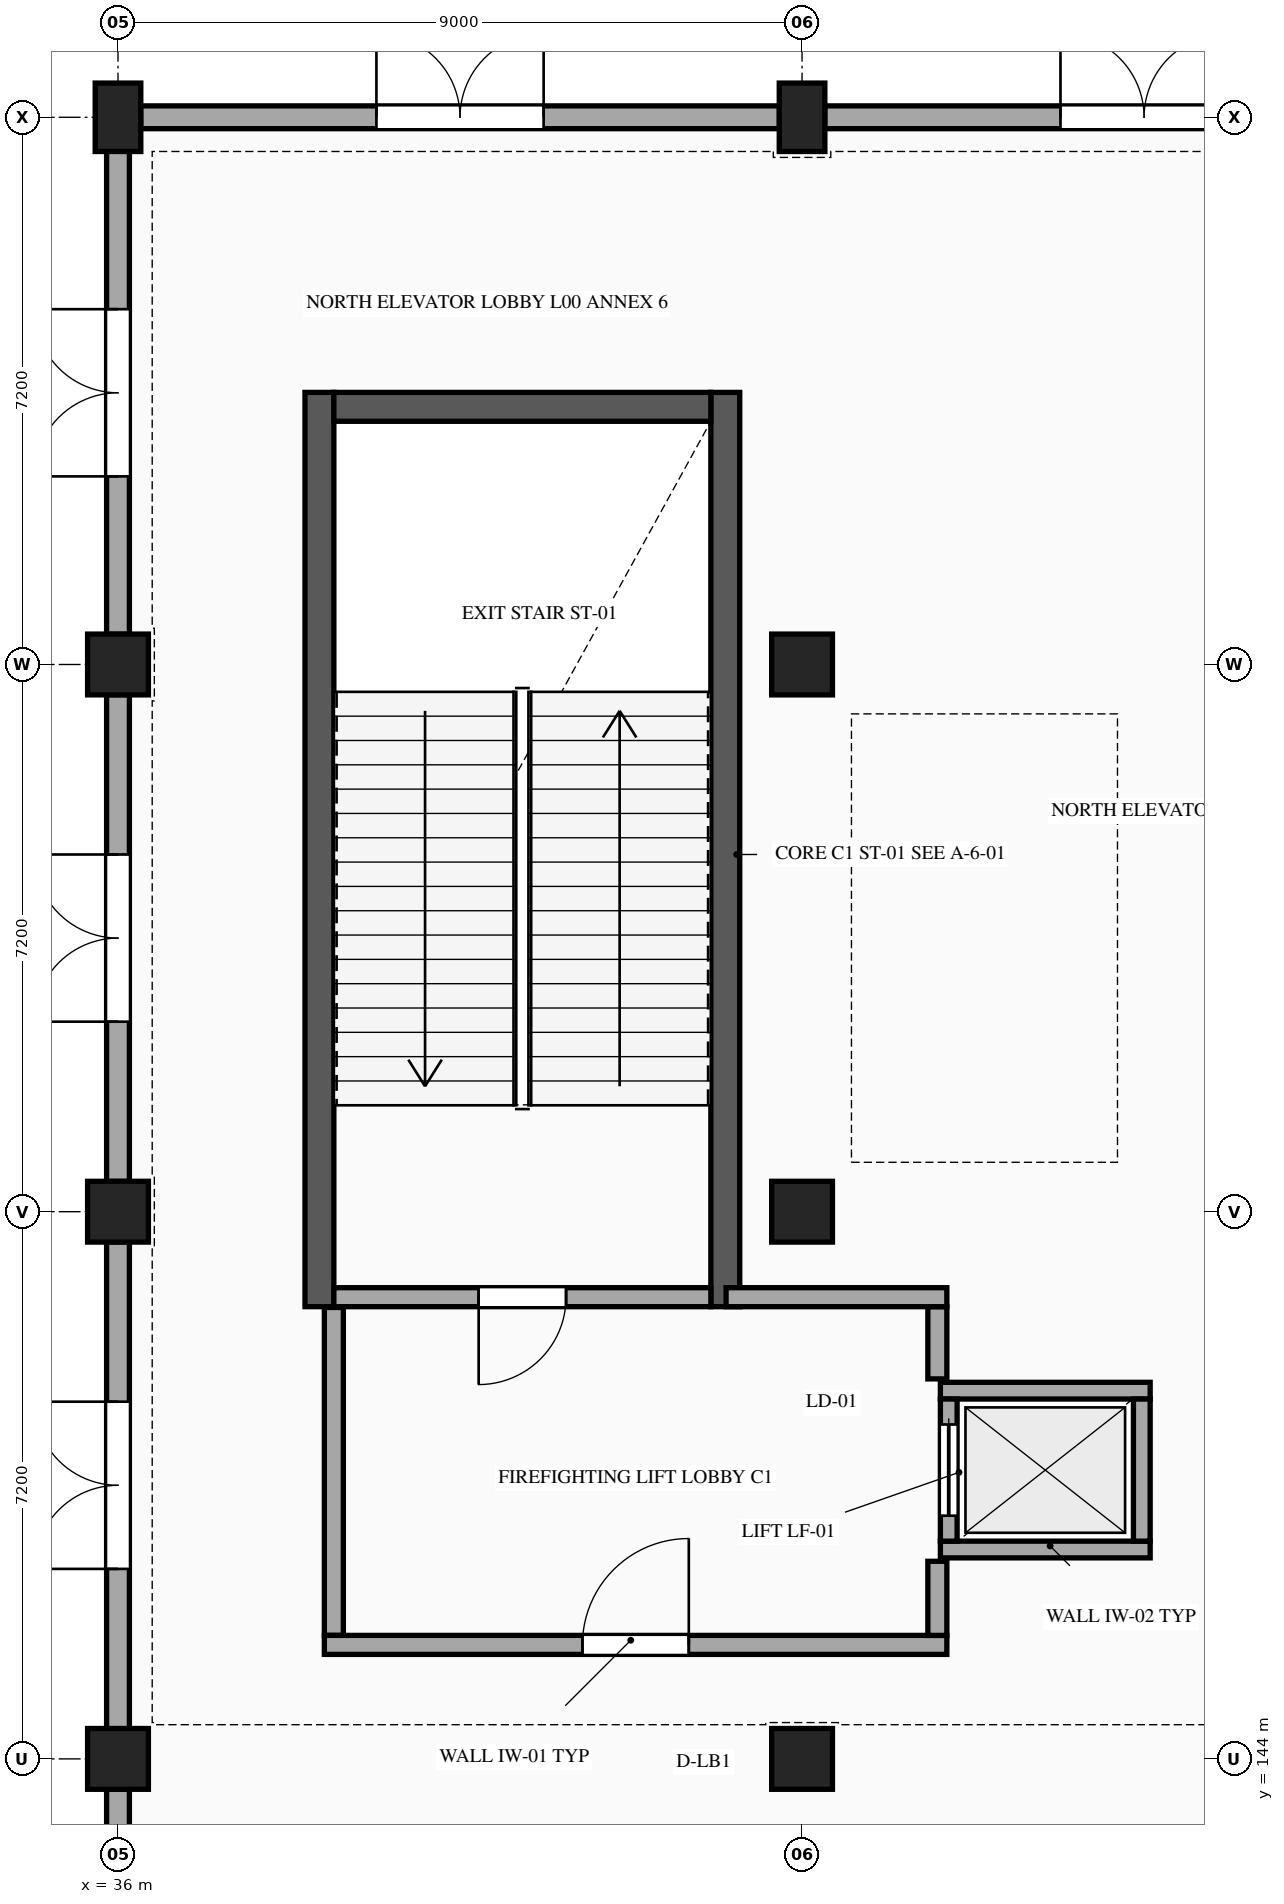
"""IFC4 building model, lengths in metres.
Left out: names, types, materials, properties, quantities, classifications, styles, units other than length and angle.
Written with IfcOpenShell. Run it as: python <this file> out.ifc"""

import sys

from ifc_helpers import new_model, si_unit, direction, frame, frame_2d, origin, origin_2d, place, context, subcontext, project, spatial, rectangle, extrude, element, fill, save


model = new_model("IFC4")
c1 = context("Model", 3, precision=1e-05, world=origin(), true_north=direction((0.0, 1.0)))
c2 = subcontext(c1, "Body", "Model", "MODEL_VIEW")
j1 = project(units=[si_unit("LENGTHUNIT", "METRE"), si_unit("PLANEANGLEUNIT", "RADIAN")], contexts=[c1])
p1 = place(None, origin())
s1 = spatial("IfcSite", under=j1, at=p1, CompositionType="ELEMENT")
p2 = place(p1, origin())
s2 = spatial("IfcBuilding", under=s1, at=p2, CompositionType="ELEMENT")
p3 = place(p2, origin())
s3 = spatial("IfcBuildingStorey", under=s2, at=p3, CompositionType="ELEMENT", Elevation=0.0)
for number, where, z_axis, x_axis in (
    (1, (36.0, 144.0, 0.0), (0.0, 0.0, 1.0), (1.0, 0.0, 0.0)),
    (2, (36.0, 151.2, 0.0), (0.0, 0.0, 1.0), (1.0, 0.0, 0.0)),
    (3, (36.0, 158.4, 0.0), (0.0, 0.0, 1.0), (1.0, 0.0, 0.0)),
):
    element("IfcColumn", number, at=place(p3, frame(where, z_axis=z_axis, x_axis=x_axis)), inside=s3, PredefinedType="COLUMN", context=c2, shape_type="SweptSolid", body=[
        extrude(rectangle(XDim=0.8, YDim=0.8, at=origin_2d()), origin(), (0.0, 0.0, 1.0), 5.4),
    ])
p4 = place(p3, frame((36.0, 165.6, 0.0), z_axis=(0.0, 0.0, 1.0), x_axis=(1.0, 0.0, 0.0)))
e4 = element("IfcColumn", 4, at=p4, inside=s3, PredefinedType="COLUMN", context=c2, shape_type="SweptSolid", body=[
    extrude(rectangle(XDim=0.6, YDim=0.9, at=origin_2d()), origin(), (0.0, 0.0, 1.0), 5.4),
])
for number, where, z_axis, x_axis in (
    (5, (45.0, 144.0, 0.0), (0.0, 0.0, 1.0), (1.0, 0.0, 0.0)),
    (6, (45.0, 151.2, 0.0), (0.0, 0.0, 1.0), (1.0, 0.0, 0.0)),
    (7, (45.0, 158.4, 0.0), (0.0, 0.0, 1.0), (1.0, 0.0, 0.0)),
):
    element("IfcColumn", number, at=place(p3, frame(where, z_axis=z_axis, x_axis=x_axis)), inside=s3, PredefinedType="COLUMN", context=c2, shape_type="SweptSolid", body=[
        extrude(rectangle(XDim=0.8, YDim=0.8, at=origin_2d()), origin(), (0.0, 0.0, 1.0), 5.4),
    ])
p5 = place(p3, frame((45.0, 165.6, 0.0), z_axis=(0.0, 0.0, 1.0), x_axis=(1.0, 0.0, 0.0)))
e8 = element("IfcColumn", 8, at=p5, inside=s3, PredefinedType="COLUMN", context=c2, shape_type="SweptSolid", body=[
    extrude(rectangle(XDim=0.6, YDim=0.9, at=origin_2d()), origin(), (0.0, 0.0, 1.0), 5.4),
])
for number, where, z_axis, x_axis in (
    (9, (38.65, 149.95, 0.0), (0.0, 0.0, 1.0), (0.0, 1.0, 0.0)),
    (10, (43.99, 161.98, 0.0), (0.0, 0.0, 1.0), (0.0, -1.0, 0.0)),
):
    element("IfcWall", number, at=place(p3, frame(where, z_axis=z_axis, x_axis=x_axis)), inside=s3, PredefinedType="SHEAR", context=c2, shape_type="SweptSolid", body=[
        extrude(rectangle(XDim=12.03, YDim=0.38, at=frame_2d((6.015, 0.0))), origin(), (0.0, 0.0, 1.0), 5.12),
    ])
p6 = place(p3, frame((38.84, 161.79, 0.0), z_axis=(0.0, 0.0, 1.0), x_axis=(1.0, 0.0, 0.0)))
e11 = element("IfcWall", 11, at=p6, inside=s3, PredefinedType="SHEAR", context=c2, shape_type="SweptSolid", body=[
    extrude(rectangle(XDim=4.96, YDim=0.38, at=frame_2d((2.48, 0.0))), origin(), (0.0, 0.0, 1.0), 5.12),
])
p7 = place(p3, frame((36.0, 137.198, 0.0), z_axis=(0.0, 0.0, 1.0), x_axis=(0.0, 1.0, 0.0)))
e12 = element("IfcWall", 12, at=p7, inside=s3, PredefinedType="STANDARD", context=c2, shape_type="SweptSolid", body=[
    extrude(rectangle(XDim=6.404, YDim=0.3, at=frame_2d((3.202, 0.0))), origin(), (0.0, 0.0, 1.0), 4.82),
])
p8 = place(p7, frame((2.102, 0.0, 0.0)))
e13 = element("IfcOpeningElement", 13, at=p8, cuts=e12, PredefinedType="OPENING", context=c2, shape_type="SweptSolid", body=[
    extrude(rectangle(XDim=2.2, YDim=2.4, at=frame_2d((1.1, 1.2))), frame((0.0, 0.16, 0.0), z_axis=(0.0, -1.0, 0.0), x_axis=(1.0, 0.0, 0.0)), (0.0, 0.0, 1.0), 0.32),
])
p9 = place(p3, frame((36.0, 144.398, 0.0), z_axis=(0.0, 0.0, 1.0), x_axis=(0.0, 1.0, 0.0)))
e14 = element("IfcWall", 14, at=p9, inside=s3, PredefinedType="STANDARD", context=c2, shape_type="SweptSolid", body=[
    extrude(rectangle(XDim=6.404, YDim=0.3, at=frame_2d((3.202, 0.0))), origin(), (0.0, 0.0, 1.0), 4.82),
])
p10 = place(p9, frame((2.102, 0.0, 0.0)))
e15 = element("IfcOpeningElement", 15, at=p10, cuts=e14, PredefinedType="OPENING", context=c2, shape_type="SweptSolid", body=[
    extrude(rectangle(XDim=2.2, YDim=2.4, at=frame_2d((1.1, 1.2))), frame((0.0, 0.16, 0.0), z_axis=(0.0, -1.0, 0.0), x_axis=(1.0, 0.0, 0.0)), (0.0, 0.0, 1.0), 0.32),
])
p11 = place(p3, frame((36.0, 151.598, 0.0), z_axis=(0.0, 0.0, 1.0), x_axis=(0.0, 1.0, 0.0)))
e16 = element("IfcWall", 16, at=p11, inside=s3, PredefinedType="STANDARD", context=c2, shape_type="SweptSolid", body=[
    extrude(rectangle(XDim=6.404, YDim=0.3, at=frame_2d((3.202, 0.0))), origin(), (0.0, 0.0, 1.0), 4.82),
])
p12 = place(p11, frame((2.102, 0.0, 0.0)))
e17 = element("IfcOpeningElement", 17, at=p12, cuts=e16, PredefinedType="OPENING", context=c2, shape_type="SweptSolid", body=[
    extrude(rectangle(XDim=2.2, YDim=2.4, at=frame_2d((1.1, 1.2))), frame((0.0, 0.16, 0.0), z_axis=(0.0, -1.0, 0.0), x_axis=(1.0, 0.0, 0.0)), (0.0, 0.0, 1.0), 0.32),
])
p13 = place(p3, frame((36.0, 158.798, 0.0), z_axis=(0.0, 0.0, 1.0), x_axis=(0.0, 1.0, 0.0)))
e18 = element("IfcWall", 18, at=p13, inside=s3, PredefinedType="STANDARD", context=c2, shape_type="SweptSolid", body=[
    extrude(rectangle(XDim=6.354, YDim=0.3, at=frame_2d((3.177, 0.0))), origin(), (0.0, 0.0, 1.0), 4.82),
])
p14 = place(p13, frame((2.077, 0.0, 0.0)))
e19 = element("IfcOpeningElement", 19, at=p14, cuts=e18, PredefinedType="OPENING", context=c2, shape_type="SweptSolid", body=[
    extrude(rectangle(XDim=2.2, YDim=2.4, at=frame_2d((1.1, 1.2))), frame((0.0, 0.16, 0.0), z_axis=(0.0, -1.0, 0.0), x_axis=(1.0, 0.0, 0.0)), (0.0, 0.0, 1.0), 0.32),
])
p15 = place(p3, frame((36.298, 165.6, 0.0), z_axis=(0.0, 0.0, 1.0), x_axis=(1.0, 0.0, 0.0)))
e20 = element("IfcWall", 20, at=p15, inside=s3, PredefinedType="STANDARD", context=c2, shape_type="SweptSolid", body=[
    extrude(rectangle(XDim=8.404, YDim=0.3, at=frame_2d((4.202, 0.0))), origin(), (0.0, 0.0, 1.0), 4.747),
])
p16 = place(p15, frame((3.102, 0.0, 0.0)))
e21 = element("IfcOpeningElement", 21, at=p16, cuts=e20, PredefinedType="OPENING", context=c2, shape_type="SweptSolid", body=[
    extrude(rectangle(XDim=2.2, YDim=2.4, at=frame_2d((1.1, 1.2))), frame((0.0, 0.16, 0.0), z_axis=(0.0, -1.0, 0.0), x_axis=(1.0, 0.0, 0.0)), (0.0, 0.0, 1.0), 0.32),
])
p17 = place(p3, frame((45.298, 165.6, 0.0), z_axis=(0.0, 0.0, 1.0), x_axis=(1.0, 0.0, 0.0)))
e22 = element("IfcWall", 22, at=p17, inside=s3, PredefinedType="STANDARD", context=c2, shape_type="SweptSolid", body=[
    extrude(rectangle(XDim=8.404, YDim=0.3, at=frame_2d((4.202, 0.0))), origin(), (0.0, 0.0, 1.0), 4.653),
])
p18 = place(p17, frame((3.102, 0.0, 0.0)))
e23 = element("IfcOpeningElement", 23, at=p18, cuts=e22, PredefinedType="OPENING", context=c2, shape_type="SweptSolid", body=[
    extrude(rectangle(XDim=2.2, YDim=2.4, at=frame_2d((1.1, 1.2))), frame((0.0, 0.16, 0.0), z_axis=(0.0, -1.0, 0.0), x_axis=(1.0, 0.0, 0.0)), (0.0, 0.0, 1.0), 0.32),
])
p19 = place(p3, frame((43.8, 150.075, 0.0), z_axis=(0.0, 0.0, 1.0), x_axis=(-1.0, 0.0, 0.0)))
e24 = element("IfcWall", 24, at=p19, inside=s3, PredefinedType="STANDARD", context=c2, shape_type="SweptSolid", body=[
    extrude(rectangle(XDim=4.96, YDim=0.25, at=frame_2d((2.48, 0.0))), origin(), (0.0, 0.0, 1.0), 5.08),
])
p20 = place(p19, frame((1.905, 0.0, 0.0)))
e25 = element("IfcOpeningElement", 25, at=p20, cuts=e24, PredefinedType="OPENING", context=c2, shape_type="SweptSolid", body=[
    extrude(rectangle(XDim=1.15, YDim=2.2, at=frame_2d((0.575, 1.1))), frame((0.0, 0.135, 0.0), z_axis=(0.0, -1.0, 0.0), x_axis=(1.0, 0.0, 0.0)), (0.0, 0.0, 1.0), 0.27),
])
for number, where, z_axis, x_axis in (
    (26, (46.82, 146.755, 0.0), (0.0, 0.0, 1.0), (1.0, 0.0, 0.0)),
    (27, (49.58, 148.845, 0.0), (0.0, 0.0, 1.0), (-1.0, 0.0, 0.0)),
):
    element("IfcWall", number, at=place(p3, frame(where, z_axis=z_axis, x_axis=x_axis)), inside=s3, PredefinedType="STANDARD", context=c2, shape_type="SweptSolid", body=[
        extrude(rectangle(XDim=2.76, YDim=0.22, at=frame_2d((1.38, 0.0))), origin(), (0.0, 0.0, 1.0), 5.08),
    ])
p21 = place(p3, frame((46.93, 148.735, 0.0), z_axis=(0.0, 0.0, 1.0), x_axis=(0.0, -1.0, 0.0)))
e28 = element("IfcWall", 28, at=p21, inside=s3, PredefinedType="STANDARD", context=c2, shape_type="SweptSolid", body=[
    extrude(rectangle(XDim=1.87, YDim=0.22, at=frame_2d((0.935, 0.0))), origin(), (0.0, 0.0, 1.0), 5.08),
])
p22 = place(p21, frame((0.335, 0.0, 0.0)))
e29 = element("IfcOpeningElement", 29, at=p22, cuts=e28, PredefinedType="OPENING", context=c2, shape_type="SweptSolid", body=[
    extrude(rectangle(XDim=1.2, YDim=2.2, at=frame_2d((0.6, 1.1))), frame((0.0, 0.12, 0.0), z_axis=(0.0, -1.0, 0.0), x_axis=(1.0, 0.0, 0.0)), (0.0, 0.0, 1.0), 0.24),
])
p23 = place(p3, frame((49.47, 146.865, 0.0), z_axis=(0.0, 0.0, 1.0), x_axis=(0.0, 1.0, 0.0)))
e30 = element("IfcWall", 30, at=p23, inside=s3, PredefinedType="STANDARD", context=c2, shape_type="SweptSolid", body=[
    extrude(rectangle(XDim=1.87, YDim=0.22, at=frame_2d((0.935, 0.0))), origin(), (0.0, 0.0, 1.0), 5.08),
])
p24 = place(p3, frame((38.84, 149.94, 0.0), z_axis=(0.0, 0.0, 1.0), x_axis=(0.0, -1.0, 0.0)))
e31 = element("IfcWall", 31, at=p24, inside=s3, PredefinedType="STANDARD", context=c2, shape_type="SweptSolid", body=[
    extrude(rectangle(XDim=4.315, YDim=0.25, at=frame_2d((2.157, 0.0))), origin(), (0.0, 0.0, 1.0), 4.437),
])
p25 = place(p3, frame((38.715, 145.5, 0.0), z_axis=(0.0, 0.0, 1.0), x_axis=(1.0, 0.0, 0.0)))
e32 = element("IfcWall", 32, at=p25, inside=s3, PredefinedType="STANDARD", context=c2, shape_type="SweptSolid", body=[
    extrude(rectangle(XDim=8.19, YDim=0.25, at=frame_2d((4.095, 0.0))), origin(), (0.0, 0.0, 1.0), 4.437),
])
p26 = place(p25, frame((3.395, 0.0, 0.0)))
e33 = element("IfcOpeningElement", 33, at=p26, cuts=e32, PredefinedType="OPENING", context=c2, shape_type="SweptSolid", body=[
    extrude(rectangle(XDim=1.4, YDim=2.2, at=frame_2d((0.7, 1.1))), frame((0.0, 0.135, 0.0), z_axis=(0.0, -1.0, 0.0), x_axis=(1.0, 0.0, 0.0)), (0.0, 0.0, 1.0), 0.27),
])
p27 = place(p3, frame((46.78, 145.625, 0.0), z_axis=(0.0, 0.0, 1.0), x_axis=(0.0, 1.0, 0.0)))
e34 = element("IfcWall", 34, at=p27, inside=s3, PredefinedType="STANDARD", context=c2, shape_type="SweptSolid", body=[
    extrude(rectangle(XDim=0.975, YDim=0.25, at=frame_2d((0.488, 0.0))), origin(), (0.0, 0.0, 1.0), 4.437),
])
p28 = place(p3, frame((46.78, 149.0, 0.0), z_axis=(0.0, 0.0, 1.0), x_axis=(0.0, 1.0, 0.0)))
e35 = element("IfcWall", 35, at=p28, inside=s3, PredefinedType="STANDARD", context=c2, shape_type="SweptSolid", body=[
    extrude(rectangle(XDim=0.95, YDim=0.25, at=frame_2d((0.475, 0.0))), origin(), (0.0, 0.0, 1.0), 4.437),
])
p29 = place(p3, frame((44.0, 150.075, 0.0), z_axis=(0.0, 0.0, 1.0), x_axis=(1.0, 0.0, 0.0)))
e36 = element("IfcWall", 36, at=p29, inside=s3, PredefinedType="STANDARD", context=c2, shape_type="SweptSolid", body=[
    extrude(rectangle(XDim=2.905, YDim=0.25, at=frame_2d((1.453, 0.0))), origin(), (0.0, 0.0, 1.0), 4.437),
])
p30 = place(p10, origin())
e37 = element("IfcDoor", 37, at=p30, inside=s3, OperationType="DOUBLE_DOOR_SINGLE_SWING", PredefinedType="DOOR", context=c2, shape_type="SweptSolid", body=[
    extrude(rectangle(XDim=2.2, YDim=2.4, at=frame_2d((1.1, 1.2))), frame((0.0, 0.025, 0.0), z_axis=(0.0, -1.0, 0.0), x_axis=(1.0, 0.0, 0.0)), (0.0, 0.0, 1.0), 0.05),
])
fill(e15, e37)
p31 = place(p12, origin())
e38 = element("IfcDoor", 38, at=p31, inside=s3, OperationType="DOUBLE_DOOR_SINGLE_SWING", PredefinedType="DOOR", context=c2, shape_type="SweptSolid", body=[
    extrude(rectangle(XDim=2.2, YDim=2.4, at=frame_2d((1.1, 1.2))), frame((0.0, 0.025, 0.0), z_axis=(0.0, -1.0, 0.0), x_axis=(1.0, 0.0, 0.0)), (0.0, 0.0, 1.0), 0.05),
])
fill(e17, e38)
p32 = place(p14, origin())
e39 = element("IfcDoor", 39, at=p32, inside=s3, OperationType="DOUBLE_DOOR_SINGLE_SWING", PredefinedType="DOOR", context=c2, shape_type="SweptSolid", body=[
    extrude(rectangle(XDim=2.2, YDim=2.4, at=frame_2d((1.1, 1.2))), frame((0.0, 0.025, 0.0), z_axis=(0.0, -1.0, 0.0), x_axis=(1.0, 0.0, 0.0)), (0.0, 0.0, 1.0), 0.05),
])
fill(e19, e39)
p33 = place(p16, origin())
e40 = element("IfcDoor", 40, at=p33, inside=s3, OperationType="DOUBLE_DOOR_SINGLE_SWING", PredefinedType="DOOR", context=c2, shape_type="SweptSolid", body=[
    extrude(rectangle(XDim=2.2, YDim=2.4, at=frame_2d((1.1, 1.2))), frame((0.0, 0.025, 0.0), z_axis=(0.0, -1.0, 0.0), x_axis=(1.0, 0.0, 0.0)), (0.0, 0.0, 1.0), 0.05),
])
fill(e21, e40)
p34 = place(p18, origin())
e41 = element("IfcDoor", 41, at=p34, inside=s3, OperationType="DOUBLE_DOOR_SINGLE_SWING", PredefinedType="DOOR", context=c2, shape_type="SweptSolid", body=[
    extrude(rectangle(XDim=2.2, YDim=2.4, at=frame_2d((1.1, 1.2))), frame((0.0, 0.025, 0.0), z_axis=(0.0, -1.0, 0.0), x_axis=(1.0, 0.0, 0.0)), (0.0, 0.0, 1.0), 0.05),
])
fill(e23, e41)
p35 = place(p20, origin())
e42 = element("IfcDoor", 42, at=p35, inside=s3, OperationType="SINGLE_SWING_RIGHT", PredefinedType="DOOR", context=c2, shape_type="SweptSolid", body=[
    extrude(rectangle(XDim=1.15, YDim=2.2, at=frame_2d((0.575, 1.1))), frame((0.0, 0.025, 0.0), z_axis=(0.0, -1.0, 0.0), x_axis=(1.0, 0.0, 0.0)), (0.0, 0.0, 1.0), 0.05),
])
fill(e25, e42)
p36 = place(p22, origin())
e43 = element("IfcDoor", 43, at=p36, inside=s3, OperationType="DOUBLE_DOOR_SLIDING", PredefinedType="DOOR", context=c2, shape_type="SweptSolid", body=[
    extrude(rectangle(XDim=1.2, YDim=2.2, at=frame_2d((0.6, 1.1))), frame((0.0, 0.025, 0.0), z_axis=(0.0, -1.0, 0.0), x_axis=(1.0, 0.0, 0.0)), (0.0, 0.0, 1.0), 0.05),
])
fill(e29, e43)
p37 = place(p26, origin())
e44 = element("IfcDoor", 44, at=p37, inside=s3, OperationType="SINGLE_SWING_RIGHT", PredefinedType="DOOR", context=c2, shape_type="SweptSolid", body=[
    extrude(rectangle(XDim=1.4, YDim=2.2, at=frame_2d((0.7, 1.1))), frame((0.0, 0.025, 0.0), z_axis=(0.0, -1.0, 0.0), x_axis=(1.0, 0.0, 0.0)), (0.0, 0.0, 1.0), 0.05),
])
fill(e33, e44)
save(model, sys.argv[1])
